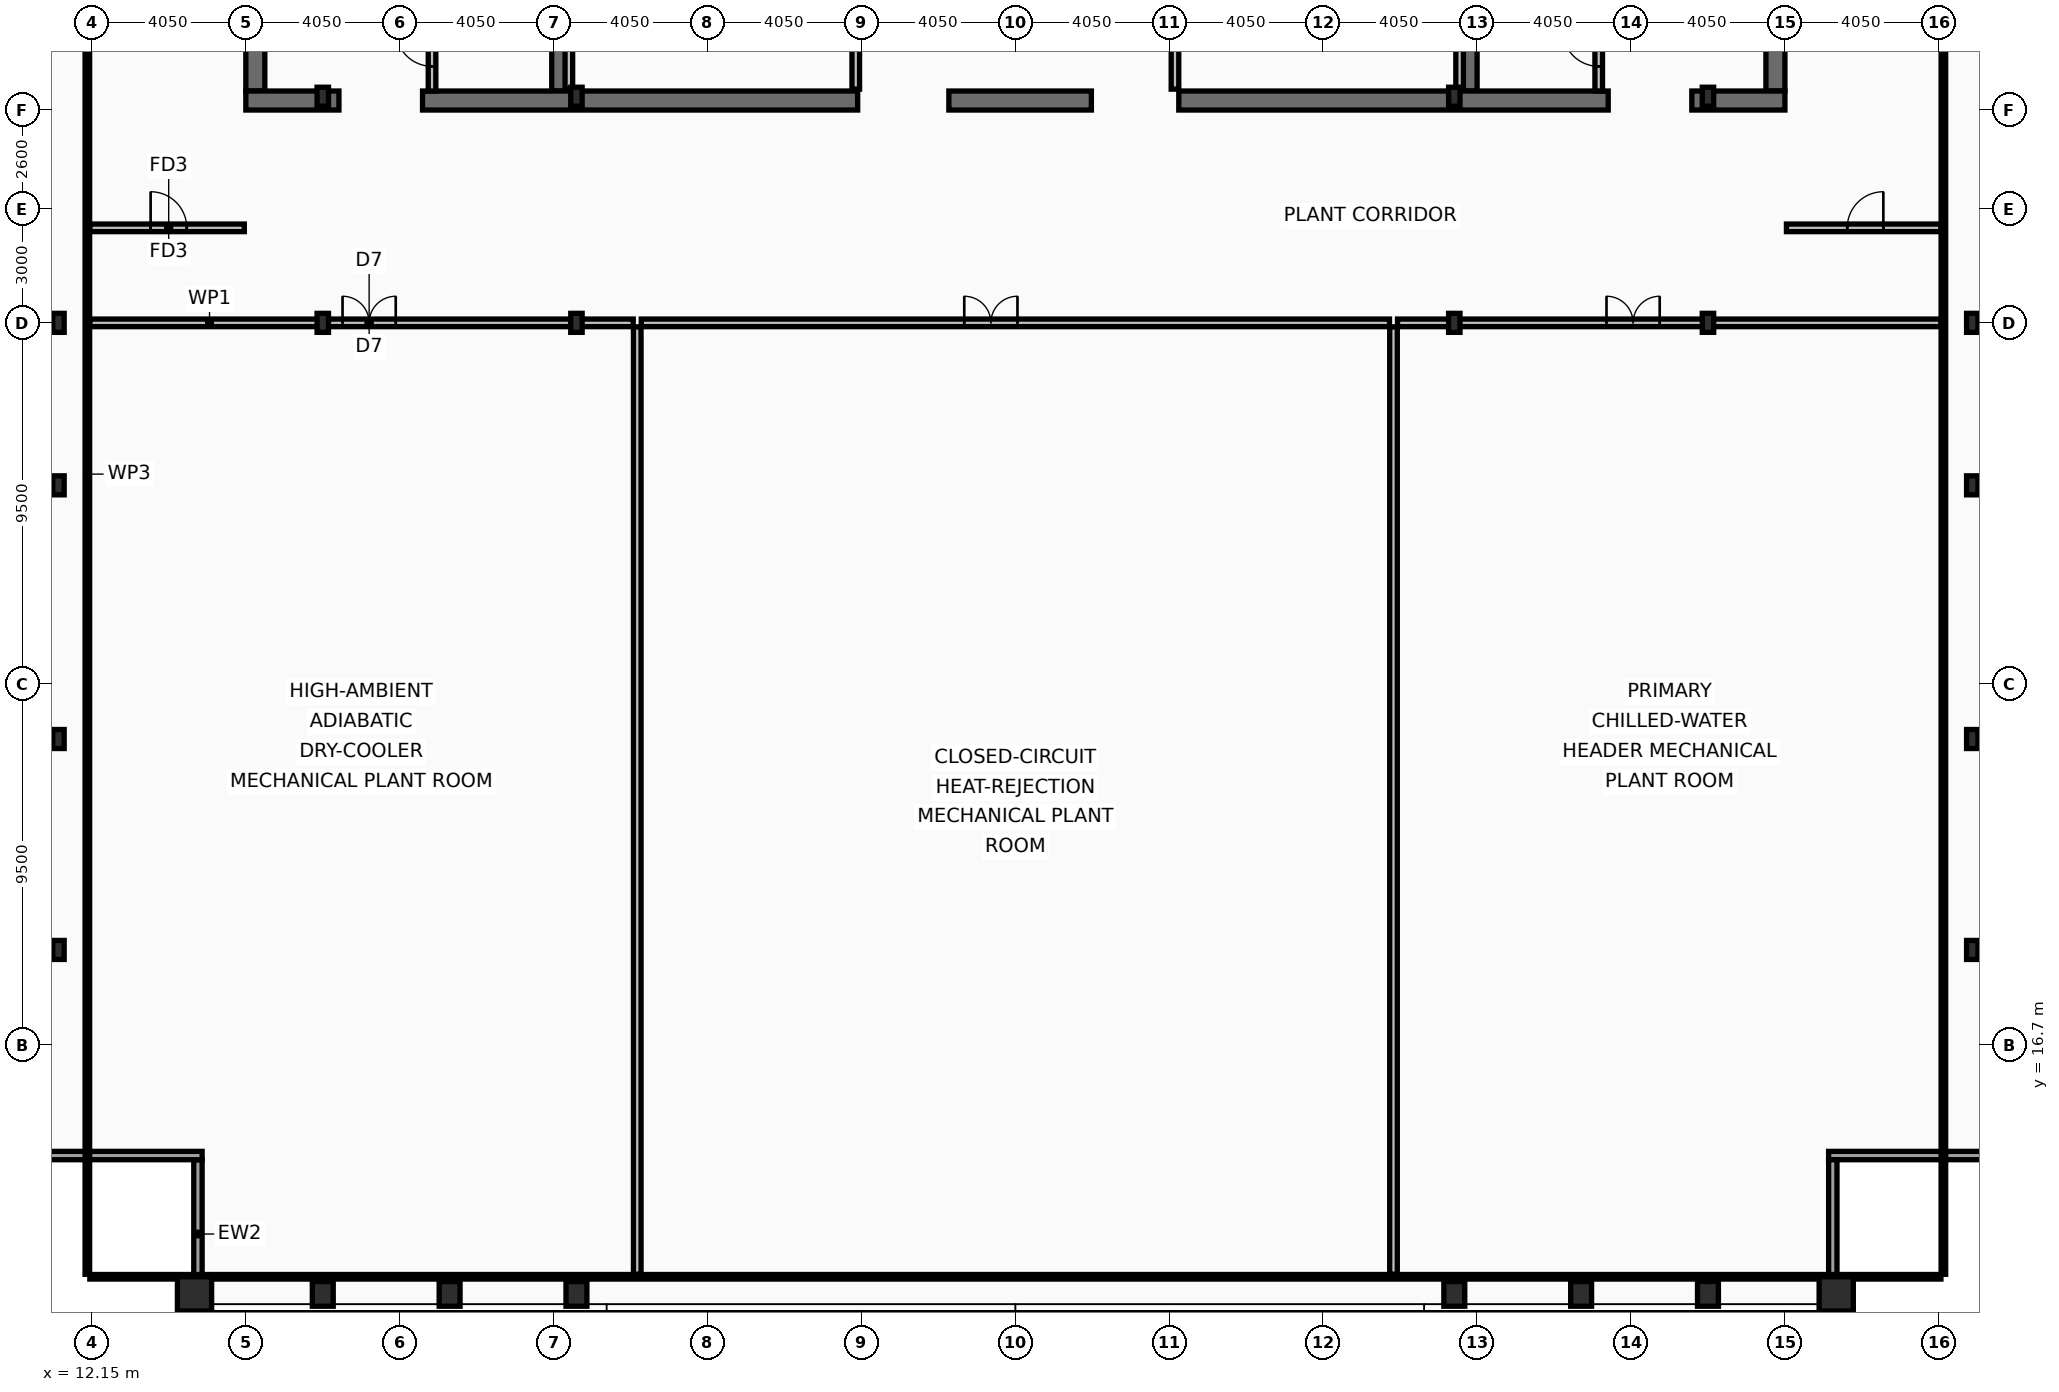
"""IFC4 building model, lengths in metres.
Left out: names, types, materials, properties, quantities, classifications, styles, units other than length and angle.
Written with IfcOpenShell. Run it as: python <this file> out.ifc"""

import sys

from ifc_helpers import new_model, si_unit, direction, frame, frame_2d, origin, origin_2d, place, context, subcontext, project, spatial, rectangle, hollow_rectangle, i_section, extrude, element, fill, save


model = new_model("IFC4")
c1 = context("Model", 3, precision=1e-05, world=origin(), true_north=direction((0.0, 1.0)))
c2 = subcontext(c1, "Body", "Model", "MODEL_VIEW")
j1 = project(units=[si_unit("LENGTHUNIT", "METRE"), si_unit("PLANEANGLEUNIT", "RADIAN")], contexts=[c1])
p1 = place(None, origin())
s1 = spatial("IfcSite", under=j1, at=p1, CompositionType="ELEMENT")
p2 = place(p1, origin())
s2 = spatial("IfcBuilding", under=s1, at=p2, CompositionType="ELEMENT")
p3 = place(p2, frame((0.0, 0.0, 367.4)))
s3 = spatial("IfcBuildingStorey", under=s2, at=p3, CompositionType="ELEMENT", Elevation=367.4)
for number, where, z_axis, x_axis in (
    (1, (16.45, 41.8, 0.0), (0.0, 0.0, 1.0), (0.0, 1.0, 0.0)),
    (2, (56.45, 53.2, 0.0), (0.0, 0.0, 1.0), (0.0, -1.0, 0.0)),
):
    element("IfcWall", number, at=place(p3, frame(where, z_axis=z_axis, x_axis=x_axis)), inside=s3, PredefinedType="SHEAR", context=c2, shape_type="SweptSolid", body=[
        extrude(rectangle(XDim=11.4, YDim=0.5, at=frame_2d((5.7, 0.0))), origin(), (0.0, 0.0, 1.0), 5.4),
    ])
for number, where, z_axis, x_axis in (
    (3, (24.45, 41.8, 0.0), (0.0, 0.0, 1.0), (0.0, 1.0, 0.0)),
    (4, (48.4, 41.8, 0.0), (0.0, 0.0, 1.0), (0.0, 1.0, 0.0)),
):
    element("IfcWall", number, at=place(p3, frame(where, z_axis=z_axis, x_axis=x_axis)), inside=s3, PredefinedType="SHEAR", context=c2, shape_type="SweptSolid", body=[
        extrude(rectangle(XDim=11.4, YDim=0.4, at=frame_2d((5.7, 0.0))), origin(), (0.0, 0.0, 1.0), 5.4),
    ])
p4 = place(p3, frame((18.65, 41.55, 0.0), z_axis=(0.0, 0.0, 1.0), x_axis=(-1.0, 0.0, 0.0)))
e5 = element("IfcWall", 5, at=p4, inside=s3, PredefinedType="SHEAR", context=c2, shape_type="SweptSolid", body=[
    extrude(rectangle(XDim=2.45, YDim=0.5, at=frame_2d((1.225, 0.0))), origin(), (0.0, 0.0, 1.0), 5.4),
])
p5 = place(p3, frame((32.3, 41.55, 0.0), z_axis=(0.0, 0.0, 1.0), x_axis=(-1.0, 0.0, 0.0)))
e6 = element("IfcWall", 6, at=p5, inside=s3, PredefinedType="SHEAR", context=c2, shape_type="SweptSolid", body=[
    extrude(rectangle(XDim=11.45, YDim=0.5, at=frame_2d((5.725, 0.0))), origin(), (0.0, 0.0, 1.0), 5.4),
])
p6 = place(p3, frame((38.45, 41.55, 0.0), z_axis=(0.0, 0.0, 1.0), x_axis=(-1.0, 0.0, 0.0)))
e7 = element("IfcWall", 7, at=p6, inside=s3, PredefinedType="SHEAR", context=c2, shape_type="SweptSolid", body=[
    extrude(rectangle(XDim=3.75, YDim=0.5, at=frame_2d((1.875, 0.0))), origin(), (0.0, 0.0, 1.0), 5.4),
])
p7 = place(p3, frame((52.05, 41.55, 0.0), z_axis=(0.0, 0.0, 1.0), x_axis=(-1.0, 0.0, 0.0)))
e8 = element("IfcWall", 8, at=p7, inside=s3, PredefinedType="SHEAR", context=c2, shape_type="SweptSolid", body=[
    extrude(rectangle(XDim=11.3, YDim=0.5, at=frame_2d((5.65, 0.0))), origin(), (0.0, 0.0, 1.0), 5.4),
])
p8 = place(p3, frame((56.7, 41.55, 0.0), z_axis=(0.0, 0.0, 1.0), x_axis=(-1.0, 0.0, 0.0)))
e9 = element("IfcWall", 9, at=p8, inside=s3, PredefinedType="SHEAR", context=c2, shape_type="SweptSolid", body=[
    extrude(rectangle(XDim=2.45, YDim=0.5, at=frame_2d((1.225, 0.0))), origin(), (0.0, 0.0, 1.0), 5.4),
])
for number, where, z_axis, x_axis in (
    (10, (14.85, 10.15, 0.0), (0.0, 0.0, 1.0), (1.0, 0.0, 0.0)),
    (11, (58.05, 10.15, 0.0), (0.0, 0.0, 1.0), (1.0, 0.0, 0.0)),
):
    element("IfcColumn", number, at=place(p3, frame(where, z_axis=z_axis, x_axis=x_axis)), inside=s3, PredefinedType="COLUMN", context=c2, shape_type="SweptSolid", body=[
        extrude(hollow_rectangle(XDim=0.9, YDim=0.9, WallThickness=0.05, at=origin_2d()), origin(), (0.0, 0.0, 1.0), 5.6),
    ])
for number, where, z_axis, x_axis in (
    (12, (18.225, 10.15, 0.0), (0.0, 0.0, 1.0), (1.0, 0.0, 0.0)),
    (13, (21.562, 10.15, 0.0), (0.0, 0.0, 1.0), (1.0, 0.0, 0.0)),
    (14, (24.9, 10.15, 0.0), (0.0, 0.0, 1.0), (1.0, 0.0, 0.0)),
    (15, (48.0, 10.15, 0.0), (0.0, 0.0, 1.0), (1.0, 0.0, 0.0)),
    (16, (51.337, 10.15, 0.0), (0.0, 0.0, 1.0), (1.0, 0.0, 0.0)),
    (17, (54.675, 10.15, 0.0), (0.0, 0.0, 1.0), (1.0, 0.0, 0.0)),
):
    element("IfcColumn", number, at=place(p3, frame(where, z_axis=z_axis, x_axis=x_axis)), inside=s3, PredefinedType="COLUMN", context=c2, shape_type="SweptSolid", body=[
        extrude(hollow_rectangle(XDim=0.55, YDim=0.65, WallThickness=0.04, at=origin_2d()), origin(), (0.0, 0.0, 1.0), 5.6),
    ])
for number, where, z_axis, x_axis in (
    (18, (11.27, 19.2, 0.0), (0.0, 0.0, 1.0), (1.0, 0.0, 0.0)),
    (19, (11.27, 24.75, 0.0), (0.0, 0.0, 1.0), (1.0, 0.0, 0.0)),
    (20, (11.27, 31.425, 0.0), (0.0, 0.0, 1.0), (1.0, 0.0, 0.0)),
    (21, (11.27, 35.7, 0.0), (0.0, 0.0, 1.0), (1.0, 0.0, 0.0)),
    (22, (61.63, 19.2, 0.0), (0.0, 0.0, 1.0), (1.0, 0.0, 0.0)),
    (23, (61.63, 24.75, 0.0), (0.0, 0.0, 1.0), (1.0, 0.0, 0.0)),
    (24, (61.63, 31.425, 0.0), (0.0, 0.0, 1.0), (1.0, 0.0, 0.0)),
    (25, (61.63, 35.7, 0.0), (0.0, 0.0, 1.0), (1.0, 0.0, 0.0)),
    (26, (18.225, 35.7, 0.0), (0.0, 0.0, 1.0), (1.0, 0.0, 0.0)),
    (27, (18.225, 41.65, 0.0), (0.0, 0.0, 1.0), (1.0, 0.0, 0.0)),
    (28, (24.9, 35.7, 0.0), (0.0, 0.0, 1.0), (1.0, 0.0, 0.0)),
    (29, (24.9, 41.65, 0.0), (0.0, 0.0, 1.0), (1.0, 0.0, 0.0)),
    (30, (48.0, 35.7, 0.0), (0.0, 0.0, 1.0), (1.0, 0.0, 0.0)),
    (31, (48.0, 41.65, 0.0), (0.0, 0.0, 1.0), (1.0, 0.0, 0.0)),
    (32, (54.675, 35.7, 0.0), (0.0, 0.0, 1.0), (1.0, 0.0, 0.0)),
    (33, (54.675, 41.65, 0.0), (0.0, 0.0, 1.0), (1.0, 0.0, 0.0)),
):
    element("IfcColumn", number, at=place(p3, frame(where, z_axis=z_axis, x_axis=x_axis)), inside=s3, PredefinedType="COLUMN", context=c2, shape_type="SweptSolid", body=[
        extrude(i_section(OverallWidth=0.3, OverallDepth=0.5, WebThickness=0.014, FlangeThickness=0.028, at=origin_2d()), origin(), (0.0, 0.0, 1.0), 5.6),
    ])
p9 = place(p3, frame((14.94, 9.77, 0.0), z_axis=(0.0, 0.0, 1.0), x_axis=(0.0, 1.0, 0.0)))
e34 = element("IfcWall", 34, at=p9, inside=s3, PredefinedType="SOLIDWALL", context=c2, shape_type="SweptSolid", body=[
    extrude(rectangle(XDim=3.91, YDim=0.22, at=frame_2d((1.955, 0.0))), origin(), (0.0, 0.0, 1.0), 4.84),
])
p10 = place(p3, frame((15.05, 13.79, 0.0), z_axis=(0.0, 0.0, 1.0), x_axis=(-1.0, 0.0, 0.0)))
e35 = element("IfcWall", 35, at=p10, inside=s3, PredefinedType="SOLIDWALL", context=c2, shape_type="SweptSolid", body=[
    extrude(rectangle(XDim=4.13, YDim=0.22, at=frame_2d((2.065, 0.0))), origin(), (0.0, 0.0, 1.0), 4.84),
])
p11 = place(p3, frame((61.98, 13.79, 0.0), z_axis=(0.0, 0.0, 1.0), x_axis=(-1.0, 0.0, 0.0)))
e36 = element("IfcWall", 36, at=p11, inside=s3, PredefinedType="SOLIDWALL", context=c2, shape_type="SweptSolid", body=[
    extrude(rectangle(XDim=4.13, YDim=0.22, at=frame_2d((2.065, 0.0))), origin(), (0.0, 0.0, 1.0), 4.84),
])
p12 = place(p3, frame((57.96, 13.68, 0.0), z_axis=(0.0, 0.0, 1.0), x_axis=(0.0, -1.0, 0.0)))
e37 = element("IfcWall", 37, at=p12, inside=s3, PredefinedType="SOLIDWALL", context=c2, shape_type="SweptSolid", body=[
    extrude(rectangle(XDim=3.91, YDim=0.22, at=frame_2d((1.955, 0.0))), origin(), (0.0, 0.0, 1.0), 4.84),
])
p13 = place(p3, frame((21.1, 41.8, 0.0), z_axis=(0.0, 0.0, 1.0), x_axis=(0.0, 1.0, 0.0)))
e38 = element("IfcWall", 38, at=p13, inside=s3, PredefinedType="PARTITIONING", context=c2, shape_type="SweptSolid", body=[
    extrude(rectangle(XDim=4.215, YDim=0.2, at=frame_2d((2.107, 0.0))), origin(), (0.0, 0.0, 1.0), 5.4),
])
p14 = place(p13, frame((0.65, 0.0, 0.0)))
e39 = element("IfcOpeningElement", 39, at=p14, cuts=e38, PredefinedType="OPENING", context=c2, shape_type="SweptSolid", body=[
    extrude(rectangle(XDim=0.95, YDim=2.1, at=frame_2d((0.475, 1.05))), frame((0.0, 0.11, 0.0), z_axis=(0.0, -1.0, 0.0), x_axis=(1.0, 0.0, 0.0)), (0.0, 0.0, 1.0), 0.22),
])
p15 = place(p3, frame((51.8, 41.8, 0.0), z_axis=(0.0, 0.0, 1.0), x_axis=(0.0, 1.0, 0.0)))
e40 = element("IfcWall", 40, at=p15, inside=s3, PredefinedType="PARTITIONING", context=c2, shape_type="SweptSolid", body=[
    extrude(rectangle(XDim=4.215, YDim=0.2, at=frame_2d((2.107, 0.0))), origin(), (0.0, 0.0, 1.0), 5.4),
])
p16 = place(p15, frame((0.65, 0.0, 0.0)))
e41 = element("IfcOpeningElement", 41, at=p16, cuts=e40, PredefinedType="OPENING", context=c2, shape_type="SweptSolid", body=[
    extrude(rectangle(XDim=0.95, YDim=2.1, at=frame_2d((0.475, 1.05))), frame((0.0, 0.11, 0.0), z_axis=(0.0, -1.0, 0.0), x_axis=(1.0, 0.0, 0.0)), (0.0, 0.0, 1.0), 0.22),
])
for number, where, z_axis, x_axis in (
    (42, (24.7, 41.85, 0.0), (0.0, 0.0, 1.0), (0.0, 1.0, 0.0)),
    (43, (32.25, 41.85, 0.0), (0.0, 0.0, 1.0), (0.0, 1.0, 0.0)),
    (44, (40.65, 41.85, 0.0), (0.0, 0.0, 1.0), (0.0, 1.0, 0.0)),
    (45, (48.14, 41.85, 0.0), (0.0, 0.0, 1.0), (0.0, 1.0, 0.0)),
):
    element("IfcWall", number, at=place(p3, frame(where, z_axis=z_axis, x_axis=x_axis)), inside=s3, PredefinedType="PARTITIONING", context=c2, shape_type="SweptSolid", body=[
        extrude(rectangle(XDim=2.395, YDim=0.2, at=frame_2d((1.198, 0.0))), origin(), (0.0, 0.0, 1.0), 5.4),
    ])
p17 = place(p3, frame((12.095, 35.7, 0.0), z_axis=(0.0, 0.0, 1.0), x_axis=(1.0, 0.0, 0.0)))
e46 = element("IfcWall", 46, at=p17, inside=s3, PredefinedType="PARTITIONING", context=c2, shape_type="SweptSolid", body=[
    extrude(rectangle(XDim=14.3, YDim=0.2, at=frame_2d((7.15, 0.0))), origin(), (0.0, 0.0, 1.0), 4.79),
])
p18 = place(p17, frame((6.65, 0.0, 0.0)))
e47 = element("IfcOpeningElement", 47, at=p18, cuts=e46, PredefinedType="OPENING", context=c2, shape_type="SweptSolid", body=[
    extrude(rectangle(XDim=1.4, YDim=2.15, at=frame_2d((0.7, 1.075))), frame((0.0, 0.11, 0.0), z_axis=(0.0, -1.0, 0.0), x_axis=(1.0, 0.0, 0.0)), (0.0, 0.0, 1.0), 0.22),
])
p19 = place(p3, frame((26.605, 35.7, 0.0), z_axis=(0.0, 0.0, 1.0), x_axis=(1.0, 0.0, 0.0)))
e48 = element("IfcWall", 48, at=p19, inside=s3, PredefinedType="PARTITIONING", context=c2, shape_type="SweptSolid", body=[
    extrude(rectangle(XDim=19.69, YDim=0.2, at=frame_2d((9.845, 0.0))), origin(), (0.0, 0.0, 1.0), 5.03),
])
p20 = place(p19, frame((8.5, 0.0, 0.0)))
e49 = element("IfcOpeningElement", 49, at=p20, cuts=e48, PredefinedType="OPENING", context=c2, shape_type="SweptSolid", body=[
    extrude(rectangle(XDim=1.4, YDim=2.15, at=frame_2d((0.7, 1.075))), frame((0.0, 0.11, 0.0), z_axis=(0.0, -1.0, 0.0), x_axis=(1.0, 0.0, 0.0)), (0.0, 0.0, 1.0), 0.22),
])
p21 = place(p3, frame((46.505, 35.7, 0.0), z_axis=(0.0, 0.0, 1.0), x_axis=(1.0, 0.0, 0.0)))
e50 = element("IfcWall", 50, at=p21, inside=s3, PredefinedType="PARTITIONING", context=c2, shape_type="SweptSolid", body=[
    extrude(rectangle(XDim=14.3, YDim=0.2, at=frame_2d((7.15, 0.0))), origin(), (0.0, 0.0, 1.0), 4.79),
])
p22 = place(p21, frame((5.5, 0.0, 0.0)))
e51 = element("IfcOpeningElement", 51, at=p22, cuts=e50, PredefinedType="OPENING", context=c2, shape_type="SweptSolid", body=[
    extrude(rectangle(XDim=1.4, YDim=2.15, at=frame_2d((0.7, 1.075))), frame((0.0, 0.11, 0.0), z_axis=(0.0, -1.0, 0.0), x_axis=(1.0, 0.0, 0.0)), (0.0, 0.0, 1.0), 0.22),
])
for number, where, z_axis, x_axis in (
    (52, (26.5, 10.665, 0.0), (0.0, 0.0, 1.0), (0.0, 1.0, 0.0)),
    (53, (46.4, 10.665, 0.0), (0.0, 0.0, 1.0), (0.0, 1.0, 0.0)),
):
    element("IfcWall", number, at=place(p3, frame(where, z_axis=z_axis, x_axis=x_axis)), inside=s3, PredefinedType="PARTITIONING", context=c2, shape_type="SweptSolid", body=[
        extrude(rectangle(XDim=24.93, YDim=0.2, at=frame_2d((12.465, 0.0))), origin(), (0.0, 0.0, 1.0), 5.03),
    ])
p23 = place(p3, frame((12.095, 38.2, 0.0), z_axis=(0.0, 0.0, 1.0), x_axis=(1.0, 0.0, 0.0)))
e54 = element("IfcWall", 54, at=p23, inside=s3, PredefinedType="PARTITIONING", context=c2, shape_type="SweptSolid", body=[
    extrude(rectangle(XDim=4.065, YDim=0.2, at=frame_2d((2.032, 0.0))), origin(), (0.0, 0.0, 1.0), 5.4),
])
p24 = place(p23, frame((1.6, 0.0, 0.0)))
e55 = element("IfcOpeningElement", 55, at=p24, cuts=e54, PredefinedType="OPENING", context=c2, shape_type="SweptSolid", body=[
    extrude(rectangle(XDim=0.95, YDim=2.1, at=frame_2d((0.475, 1.05))), frame((0.0, 0.11, 0.0), z_axis=(0.0, -1.0, 0.0), x_axis=(1.0, 0.0, 0.0)), (0.0, 0.0, 1.0), 0.22),
])
p25 = place(p3, frame((56.74, 38.2, 0.0), z_axis=(0.0, 0.0, 1.0), x_axis=(1.0, 0.0, 0.0)))
e56 = element("IfcWall", 56, at=p25, inside=s3, PredefinedType="PARTITIONING", context=c2, shape_type="SweptSolid", body=[
    extrude(rectangle(XDim=4.065, YDim=0.2, at=frame_2d((2.032, 0.0))), origin(), (0.0, 0.0, 1.0), 5.4),
])
p26 = place(p25, frame((1.6, 0.0, 0.0)))
e57 = element("IfcOpeningElement", 57, at=p26, cuts=e56, PredefinedType="OPENING", context=c2, shape_type="SweptSolid", body=[
    extrude(rectangle(XDim=0.95, YDim=2.1, at=frame_2d((0.475, 1.05))), frame((0.0, 0.11, 0.0), z_axis=(0.0, -1.0, 0.0), x_axis=(1.0, 0.0, 0.0)), (0.0, 0.0, 1.0), 0.22),
])
for number, where, z_axis, x_axis in (
    (58, (12.03, 10.665, 0.0), (0.0, 0.0, 1.0), (0.0, 1.0, 0.0)),
    (59, (60.87, 10.665, 0.0), (0.0, 0.0, 1.0), (0.0, 1.0, 0.0)),
):
    element("IfcWall", number, at=place(p3, frame(where, z_axis=z_axis, x_axis=x_axis)), inside=s3, PredefinedType="PARTITIONING", context=c2, shape_type="SweptSolid", body=[
        extrude(rectangle(XDim=42.11, YDim=0.12, at=frame_2d((21.055, 0.0))), origin(), (0.0, 0.0, 1.0), 4.79),
    ])
p27 = place(p3, frame((12.095, 10.6, 0.0), z_axis=(0.0, 0.0, 1.0), x_axis=(1.0, 0.0, 0.0)))
e60 = element("IfcWall", 60, at=p27, inside=s3, PredefinedType="PARTITIONING", context=c2, shape_type="SweptSolid", body=[
    extrude(rectangle(XDim=48.71, YDim=0.12, at=frame_2d((24.355, 0.0))), origin(), (0.0, 0.0, 1.0), 4.79),
])
p28 = place(p14, origin())
e61 = element("IfcDoor", 61, at=p28, inside=s3, OperationType="SINGLE_SWING_RIGHT", PredefinedType="DOOR", context=c2, shape_type="SweptSolid", body=[
    extrude(rectangle(XDim=0.95, YDim=2.1, at=frame_2d((0.475, 1.05))), frame((0.0, 0.025, 0.0), z_axis=(0.0, -1.0, 0.0), x_axis=(1.0, 0.0, 0.0)), (0.0, 0.0, 1.0), 0.05),
])
fill(e39, e61)
p29 = place(p16, origin())
e62 = element("IfcDoor", 62, at=p29, inside=s3, OperationType="SINGLE_SWING_RIGHT", PredefinedType="DOOR", context=c2, shape_type="SweptSolid", body=[
    extrude(rectangle(XDim=0.95, YDim=2.1, at=frame_2d((0.475, 1.05))), frame((0.0, 0.025, 0.0), z_axis=(0.0, -1.0, 0.0), x_axis=(1.0, 0.0, 0.0)), (0.0, 0.0, 1.0), 0.05),
])
fill(e41, e62)
p30 = place(p18, origin())
e63 = element("IfcDoor", 63, at=p30, inside=s3, OperationType="DOUBLE_DOOR_SINGLE_SWING", PredefinedType="DOOR", context=c2, shape_type="SweptSolid", body=[
    extrude(rectangle(XDim=1.4, YDim=2.15, at=frame_2d((0.7, 1.075))), frame((0.0, 0.025, 0.0), z_axis=(0.0, -1.0, 0.0), x_axis=(1.0, 0.0, 0.0)), (0.0, 0.0, 1.0), 0.05),
])
fill(e47, e63)
p31 = place(p20, origin())
e64 = element("IfcDoor", 64, at=p31, inside=s3, OperationType="DOUBLE_DOOR_SINGLE_SWING", PredefinedType="DOOR", context=c2, shape_type="SweptSolid", body=[
    extrude(rectangle(XDim=1.4, YDim=2.15, at=frame_2d((0.7, 1.075))), frame((0.0, 0.025, 0.0), z_axis=(0.0, -1.0, 0.0), x_axis=(1.0, 0.0, 0.0)), (0.0, 0.0, 1.0), 0.05),
])
fill(e49, e64)
p32 = place(p22, origin())
e65 = element("IfcDoor", 65, at=p32, inside=s3, OperationType="DOUBLE_DOOR_SINGLE_SWING", PredefinedType="DOOR", context=c2, shape_type="SweptSolid", body=[
    extrude(rectangle(XDim=1.4, YDim=2.15, at=frame_2d((0.7, 1.075))), frame((0.0, 0.025, 0.0), z_axis=(0.0, -1.0, 0.0), x_axis=(1.0, 0.0, 0.0)), (0.0, 0.0, 1.0), 0.05),
])
fill(e51, e65)
p33 = place(p24, origin())
e66 = element("IfcDoor", 66, at=p33, inside=s3, OperationType="SINGLE_SWING_LEFT", PredefinedType="DOOR", context=c2, shape_type="SweptSolid", body=[
    extrude(rectangle(XDim=0.95, YDim=2.1, at=frame_2d((0.475, 1.05))), frame((0.0, 0.025, 0.0), z_axis=(0.0, -1.0, 0.0), x_axis=(1.0, 0.0, 0.0)), (0.0, 0.0, 1.0), 0.05),
])
fill(e55, e66)
p34 = place(p26, origin())
e67 = element("IfcDoor", 67, at=p34, inside=s3, OperationType="SINGLE_SWING_RIGHT", PredefinedType="DOOR", context=c2, shape_type="SweptSolid", body=[
    extrude(rectangle(XDim=0.95, YDim=2.1, at=frame_2d((0.475, 1.05))), frame((0.0, 0.025, 0.0), z_axis=(0.0, -1.0, 0.0), x_axis=(1.0, 0.0, 0.0)), (0.0, 0.0, 1.0), 0.05),
])
fill(e57, e67)
save(model, sys.argv[1])
